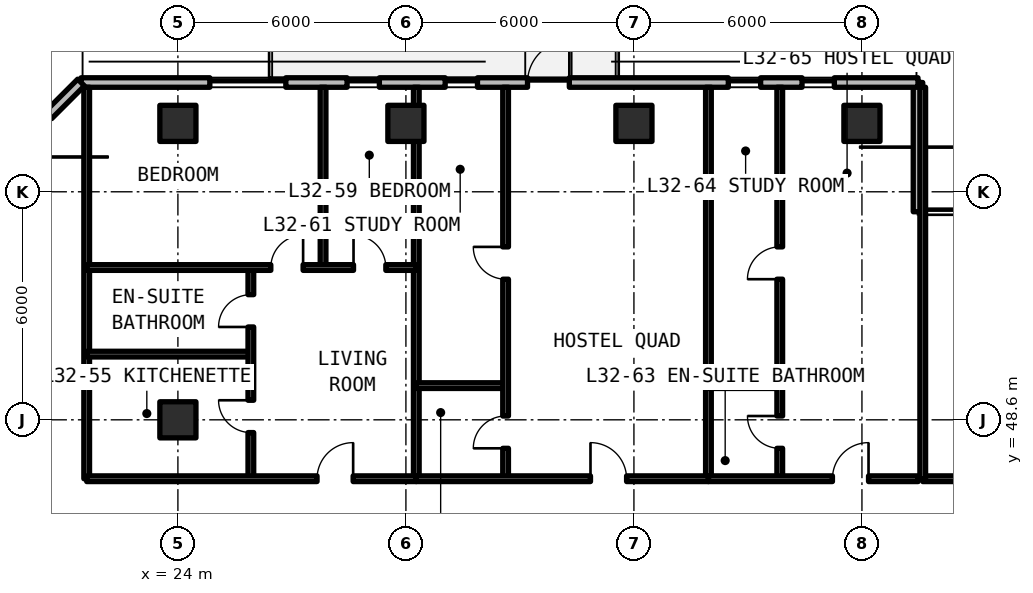
"""IFC4 building model, lengths in metres.
Left out: names, types, materials, properties, quantities, classifications, styles, units other than length and angle.
Written with IfcOpenShell. Run it as: python <this file> out.ifc"""

import sys

from ifc_helpers import new_model, si_unit, direction, frame, frame_2d, origin, origin_2d, place, context, subcontext, project, spatial, rectangle, extrude, element, fill, save


model = new_model("IFC4")
c1 = context("Model", 3, precision=1e-05, world=origin(), true_north=direction((0.0, 1.0)))
c2 = subcontext(c1, "Body", "Model", "MODEL_VIEW")
j1 = project(units=[si_unit("LENGTHUNIT", "METRE"), si_unit("PLANEANGLEUNIT", "RADIAN")], contexts=[c1])
p1 = place(None, origin())
s1 = spatial("IfcSite", under=j1, at=p1, CompositionType="ELEMENT")
p2 = place(p1, origin())
s2 = spatial("IfcBuilding", under=s1, at=p2, CompositionType="ELEMENT")
p3 = place(p2, frame((0.0, 0.0, 115.83)))
s3 = spatial("IfcBuildingStorey", under=s2, at=p3, CompositionType="ELEMENT", Elevation=115.83)
for number, where, z_axis, x_axis in (
    (1, (24.0, 48.6, 0.0), (0.0, 0.0, 1.0), (1.0, 0.0, 0.0)),
    (2, (24.0, 56.4, 0.0), (0.0, 0.0, 1.0), (1.0, 0.0, 0.0)),
    (3, (30.0, 56.4, 0.0), (0.0, 0.0, 1.0), (1.0, 0.0, 0.0)),
    (4, (36.0, 56.4, 0.0), (0.0, 0.0, 1.0), (1.0, 0.0, 0.0)),
    (5, (42.0, 56.4, 0.0), (0.0, 0.0, 1.0), (1.0, 0.0, 0.0)),
):
    element("IfcColumn", number, at=place(p3, frame(where, z_axis=z_axis, x_axis=x_axis)), inside=s3, PredefinedType="COLUMN", context=c2, shape_type="SweptSolid", body=[
        extrude(rectangle(XDim=0.95, YDim=0.95, at=origin_2d()), origin(), (0.0, 0.0, 1.0), 3.63),
    ])
p4 = place(p3, frame((43.475, 54.075, 0.0), z_axis=(0.0, 0.0, 1.0), x_axis=(0.0, 1.0, 0.0)))
e6 = element("IfcWall", 6, at=p4, inside=s3, PredefinedType="SOLIDWALL", context=c2, shape_type="SweptSolid", body=[
    extrude(rectangle(XDim=3.4, YDim=0.25, at=frame_2d((1.7, 0.0))), origin(), (0.0, 0.0, 1.0), 3.41),
])
p5 = place(p3, frame((43.475, 57.475, 0.0), z_axis=(0.0, 0.0, 1.0), x_axis=(-1.0, 0.0, 0.0)))
e7 = element("IfcWall", 7, at=p5, inside=s3, PredefinedType="SOLIDWALL", context=c2, shape_type="SweptSolid", body=[
    extrude(rectangle(XDim=22.023, YDim=0.25, at=frame_2d((11.012, 0.0))), origin(), (0.0, 0.0, 1.0), 3.41),
])
p6 = place(p5, frame((9.175, 0.0, 0.0)))
e8 = element("IfcOpeningElement", 8, at=p6, cuts=e7, PredefinedType="OPENING", context=c2, shape_type="SweptSolid", body=[
    extrude(rectangle(XDim=1.1, YDim=2.15, at=frame_2d((0.55, 1.075))), frame((0.0, 0.135, 0.0), z_axis=(0.0, -1.0, 0.0), x_axis=(1.0, 0.0, 0.0)), (0.0, 0.0, 1.0), 0.27),
])
p7 = place(p5, frame((16.635, 0.0, 0.78)))
e9 = element("IfcOpeningElement", 9, at=p7, cuts=e7, PredefinedType="OPENING", context=c2, shape_type="SweptSolid", body=[
    extrude(rectangle(XDim=2.0, YDim=1.66, at=frame_2d((1.0, 0.83))), frame((0.0, 0.135, 0.0), z_axis=(0.0, -1.0, 0.0), x_axis=(1.0, 0.0, 0.0)), (0.0, 0.0, 1.0), 0.27),
])
p8 = place(p5, frame((14.173, 0.0, 0.78)))
e10 = element("IfcOpeningElement", 10, at=p8, cuts=e7, PredefinedType="OPENING", context=c2, shape_type="SweptSolid", body=[
    extrude(rectangle(XDim=0.85, YDim=1.65, at=frame_2d((0.425, 0.825))), frame((0.0, 0.135, 0.0), z_axis=(0.0, -1.0, 0.0), x_axis=(1.0, 0.0, 0.0)), (0.0, 0.0, 1.0), 0.27),
])
p9 = place(p5, frame((11.592, 0.0, 0.78)))
e11 = element("IfcOpeningElement", 11, at=p9, cuts=e7, PredefinedType="OPENING", context=c2, shape_type="SweptSolid", body=[
    extrude(rectangle(XDim=0.85, YDim=1.65, at=frame_2d((0.425, 0.825))), frame((0.0, 0.135, 0.0), z_axis=(0.0, -1.0, 0.0), x_axis=(1.0, 0.0, 0.0)), (0.0, 0.0, 1.0), 0.27),
])
p10 = place(p5, frame((4.141, 0.0, 0.78)))
e12 = element("IfcOpeningElement", 12, at=p10, cuts=e7, PredefinedType="OPENING", context=c2, shape_type="SweptSolid", body=[
    extrude(rectangle(XDim=0.85, YDim=1.65, at=frame_2d((0.425, 0.825))), frame((0.0, 0.135, 0.0), z_axis=(0.0, -1.0, 0.0), x_axis=(1.0, 0.0, 0.0)), (0.0, 0.0, 1.0), 0.27),
])
p11 = place(p5, frame((2.201, 0.0, 0.78)))
e13 = element("IfcOpeningElement", 13, at=p11, cuts=e7, PredefinedType="OPENING", context=c2, shape_type="SweptSolid", body=[
    extrude(rectangle(XDim=0.85, YDim=1.65, at=frame_2d((0.425, 0.825))), frame((0.0, 0.135, 0.0), z_axis=(0.0, -1.0, 0.0), x_axis=(1.0, 0.0, 0.0)), (0.0, 0.0, 1.0), 0.27),
])
p12 = place(p3, frame((21.452, 57.475, 0.0), z_axis=(0.0, 0.0, 1.0), x_axis=(-0.707106781187, -0.707106781187, 0.0)))
e14 = element("IfcWall", 14, at=p12, inside=s3, PredefinedType="SOLIDWALL", context=c2, shape_type="SweptSolid", body=[
    extrude(rectangle(XDim=5.836, YDim=0.25, at=frame_2d((2.918, 0.0))), origin(), (0.0, 0.0, 1.0), 3.41),
])
p13 = place(p12, frame((1.218, 0.0, 0.78)))
e15 = element("IfcOpeningElement", 15, at=p13, cuts=e14, PredefinedType="OPENING", context=c2, shape_type="SweptSolid", body=[
    extrude(rectangle(XDim=3.4, YDim=1.66, at=frame_2d((1.7, 0.83))), frame((0.0, 0.135, 0.0), z_axis=(0.0, -1.0, 0.0), x_axis=(1.0, 0.0, 0.0)), (0.0, 0.0, 1.0), 0.27),
])
p14 = place(p3, frame((43.6, 47.05, 0.0), z_axis=(0.0, 0.0, 1.0), x_axis=(1.0, 0.0, 0.0)))
e16 = element("IfcWall", 16, at=p14, inside=s3, PredefinedType="SOLIDWALL", context=c2, shape_type="SweptSolid", body=[
    extrude(rectangle(XDim=8.4, YDim=0.15, at=frame_2d((4.2, 0.0))), origin(), (0.0, 0.0, 1.0), 2.63),
])
p15 = place(p14, frame((3.65, 0.0, 0.0)))
e17 = element("IfcOpeningElement", 17, at=p15, cuts=e16, PredefinedType="OPENING", context=c2, shape_type="SweptSolid", body=[
    extrude(rectangle(XDim=1.1, YDim=2.15, at=frame_2d((0.55, 1.075))), frame((0.0, 0.085, 0.0), z_axis=(0.0, -1.0, 0.0), x_axis=(1.0, 0.0, 0.0)), (0.0, 0.0, 1.0), 0.17),
])
for number, where, z_axis, x_axis in (
    (18, (43.6, 47.05, 0.0), (0.0, 0.0, 1.0), (0.0, 1.0, 0.0)),
    (19, (21.6, 47.05, 0.0), (0.0, 0.0, 1.0), (0.0, 1.0, 0.0)),
    (20, (30.273, 47.05, 0.0), (0.0, 0.0, 1.0), (0.0, 1.0, 0.0)),
):
    element("IfcWall", number, at=place(p3, frame(where, z_axis=z_axis, x_axis=x_axis)), inside=s3, PredefinedType="SOLIDWALL", context=c2, shape_type="SweptSolid", body=[
        extrude(rectangle(XDim=10.3, YDim=0.15, at=frame_2d((5.15, 0.0))), origin(), (0.0, 0.0, 1.0), 2.63),
    ])
p16 = place(p3, frame((21.6, 50.329, 0.0), z_axis=(0.0, 0.0, 1.0), x_axis=(1.0, 0.0, 0.0)))
e21 = element("IfcWall", 21, at=p16, inside=s3, PredefinedType="PARTITIONING", context=c2, shape_type="SweptSolid", body=[
    extrude(rectangle(XDim=4.32, YDim=0.15, at=frame_2d((2.16, 0.0))), origin(), (0.0, 0.0, 1.0), 2.63),
])
p17 = place(p3, frame((25.92, 47.05, 0.0), z_axis=(0.0, 0.0, 1.0), x_axis=(0.0, 1.0, 0.0)))
e22 = element("IfcWall", 22, at=p17, inside=s3, PredefinedType="PARTITIONING", context=c2, shape_type="SweptSolid", body=[
    extrude(rectangle(XDim=5.557, YDim=0.15, at=frame_2d((2.779, 0.0))), origin(), (0.0, 0.0, 1.0), 2.63),
])
p18 = place(p17, frame((1.214, 0.0, 0.0)))
e23 = element("IfcOpeningElement", 23, at=p18, cuts=e22, PredefinedType="OPENING", context=c2, shape_type="SweptSolid", body=[
    extrude(rectangle(XDim=0.85, YDim=2.1, at=frame_2d((0.425, 1.05))), frame((0.0, 0.085, 0.0), z_axis=(0.0, -1.0, 0.0), x_axis=(1.0, 0.0, 0.0)), (0.0, 0.0, 1.0), 0.17),
])
p19 = place(p17, frame((3.993, 0.0, 0.0)))
e24 = element("IfcOpeningElement", 24, at=p19, cuts=e22, PredefinedType="OPENING", context=c2, shape_type="SweptSolid", body=[
    extrude(rectangle(XDim=0.85, YDim=2.1, at=frame_2d((0.425, 1.05))), frame((0.0, 0.085, 0.0), z_axis=(0.0, -1.0, 0.0), x_axis=(1.0, 0.0, 0.0)), (0.0, 0.0, 1.0), 0.17),
])
p20 = place(p3, frame((27.82, 52.607, 0.0), z_axis=(0.0, 0.0, 1.0), x_axis=(0.0, 1.0, 0.0)))
e25 = element("IfcWall", 25, at=p20, inside=s3, PredefinedType="PARTITIONING", context=c2, shape_type="SweptSolid", body=[
    extrude(rectangle(XDim=4.743, YDim=0.15, at=frame_2d((2.372, 0.0))), origin(), (0.0, 0.0, 1.0), 2.63),
])
p21 = place(p3, frame((21.6, 52.607, 0.0), z_axis=(0.0, 0.0, 1.0), x_axis=(1.0, 0.0, 0.0)))
e26 = element("IfcWall", 26, at=p21, inside=s3, PredefinedType="PARTITIONING", context=c2, shape_type="SweptSolid", body=[
    extrude(rectangle(XDim=8.673, YDim=0.15, at=frame_2d((4.336, 0.0))), origin(), (0.0, 0.0, 1.0), 2.63),
])
p22 = place(p21, frame((4.845, 0.0, 0.0)))
e27 = element("IfcOpeningElement", 27, at=p22, cuts=e26, PredefinedType="OPENING", context=c2, shape_type="SweptSolid", body=[
    extrude(rectangle(XDim=0.85, YDim=2.1, at=frame_2d((0.425, 1.05))), frame((0.0, 0.085, 0.0), z_axis=(0.0, -1.0, 0.0), x_axis=(1.0, 0.0, 0.0)), (0.0, 0.0, 1.0), 0.17),
])
p23 = place(p21, frame((7.021, 0.0, 0.0)))
e28 = element("IfcOpeningElement", 28, at=p23, cuts=e26, PredefinedType="OPENING", context=c2, shape_type="SweptSolid", body=[
    extrude(rectangle(XDim=0.85, YDim=2.1, at=frame_2d((0.425, 1.05))), frame((0.0, 0.085, 0.0), z_axis=(0.0, -1.0, 0.0), x_axis=(1.0, 0.0, 0.0)), (0.0, 0.0, 1.0), 0.17),
])
p24 = place(p3, frame((21.6, 47.05, 0.0), z_axis=(0.0, 0.0, 1.0), x_axis=(1.0, 0.0, 0.0)))
e29 = element("IfcWall", 29, at=p24, inside=s3, PredefinedType="SOLIDWALL", context=c2, shape_type="SweptSolid", body=[
    extrude(rectangle(XDim=8.673, YDim=0.15, at=frame_2d((4.336, 0.0))), origin(), (0.0, 0.0, 1.0), 2.63),
])
p25 = place(p24, frame((6.062, 0.0, 0.0)))
e30 = element("IfcOpeningElement", 30, at=p25, cuts=e29, PredefinedType="OPENING", context=c2, shape_type="SweptSolid", body=[
    extrude(rectangle(XDim=0.95, YDim=2.15, at=frame_2d((0.475, 1.075))), frame((0.0, 0.085, 0.0), z_axis=(0.0, -1.0, 0.0), x_axis=(1.0, 0.0, 0.0)), (0.0, 0.0, 1.0), 0.17),
])
p26 = place(p3, frame((37.961, 47.05, 0.0), z_axis=(0.0, 0.0, 1.0), x_axis=(0.0, 1.0, 0.0)))
e31 = element("IfcWall", 31, at=p26, inside=s3, PredefinedType="SOLIDWALL", context=c2, shape_type="SweptSolid", body=[
    extrude(rectangle(XDim=10.3, YDim=0.15, at=frame_2d((5.15, 0.0))), origin(), (0.0, 0.0, 1.0), 2.63),
])
p27 = place(p3, frame((30.273, 49.5, 0.0), z_axis=(0.0, 0.0, 1.0), x_axis=(1.0, 0.0, 0.0)))
e32 = element("IfcWall", 32, at=p27, inside=s3, PredefinedType="PARTITIONING", context=c2, shape_type="SweptSolid", body=[
    extrude(rectangle(XDim=2.35, YDim=0.15, at=frame_2d((1.175, 0.0))), origin(), (0.0, 0.0, 1.0), 2.63),
])
p28 = place(p3, frame((32.623, 47.05, 0.0), z_axis=(0.0, 0.0, 1.0), x_axis=(0.0, 1.0, 0.0)))
e33 = element("IfcWall", 33, at=p28, inside=s3, PredefinedType="PARTITIONING", context=c2, shape_type="SweptSolid", body=[
    extrude(rectangle(XDim=10.3, YDim=0.15, at=frame_2d((5.15, 0.0))), origin(), (0.0, 0.0, 1.0), 2.63),
])
p29 = place(p28, frame((0.8, 0.0, 0.0)))
e34 = element("IfcOpeningElement", 34, at=p29, cuts=e33, PredefinedType="OPENING", context=c2, shape_type="SweptSolid", body=[
    extrude(rectangle(XDim=0.85, YDim=2.1, at=frame_2d((0.425, 1.05))), frame((0.0, 0.085, 0.0), z_axis=(0.0, -1.0, 0.0), x_axis=(1.0, 0.0, 0.0)), (0.0, 0.0, 1.0), 0.17),
])
p30 = place(p28, frame((5.25, 0.0, 0.0)))
e35 = element("IfcOpeningElement", 35, at=p30, cuts=e33, PredefinedType="OPENING", context=c2, shape_type="SweptSolid", body=[
    extrude(rectangle(XDim=0.85, YDim=2.1, at=frame_2d((0.425, 1.05))), frame((0.0, 0.085, 0.0), z_axis=(0.0, -1.0, 0.0), x_axis=(1.0, 0.0, 0.0)), (0.0, 0.0, 1.0), 0.17),
])
p31 = place(p3, frame((30.273, 47.05, 0.0), z_axis=(0.0, 0.0, 1.0), x_axis=(1.0, 0.0, 0.0)))
e36 = element("IfcWall", 36, at=p31, inside=s3, PredefinedType="SOLIDWALL", context=c2, shape_type="SweptSolid", body=[
    extrude(rectangle(XDim=7.688, YDim=0.15, at=frame_2d((3.844, 0.0))), origin(), (0.0, 0.0, 1.0), 2.63),
])
p32 = place(p31, frame((4.584, 0.0, 0.0)))
e37 = element("IfcOpeningElement", 37, at=p32, cuts=e36, PredefinedType="OPENING", context=c2, shape_type="SweptSolid", body=[
    extrude(rectangle(XDim=0.95, YDim=2.15, at=frame_2d((0.475, 1.075))), frame((0.0, 0.085, 0.0), z_axis=(0.0, -1.0, 0.0), x_axis=(1.0, 0.0, 0.0)), (0.0, 0.0, 1.0), 0.17),
])
p33 = place(p3, frame((37.961, 49.5, 0.0), z_axis=(0.0, 0.0, 1.0), x_axis=(1.0, 0.0, 0.0)))
e38 = element("IfcWall", 38, at=p33, inside=s3, PredefinedType="PARTITIONING", context=c2, shape_type="SweptSolid", body=[
    extrude(rectangle(XDim=1.877, YDim=0.15, at=frame_2d((0.938, 0.0))), origin(), (0.0, 0.0, 1.0), 2.63),
])
p34 = place(p3, frame((39.837, 47.05, 0.0), z_axis=(0.0, 0.0, 1.0), x_axis=(0.0, 1.0, 0.0)))
e39 = element("IfcWall", 39, at=p34, inside=s3, PredefinedType="PARTITIONING", context=c2, shape_type="SweptSolid", body=[
    extrude(rectangle(XDim=10.3, YDim=0.15, at=frame_2d((5.15, 0.0))), origin(), (0.0, 0.0, 1.0), 2.63),
])
p35 = place(p34, frame((0.8, 0.0, 0.0)))
e40 = element("IfcOpeningElement", 40, at=p35, cuts=e39, PredefinedType="OPENING", context=c2, shape_type="SweptSolid", body=[
    extrude(rectangle(XDim=0.85, YDim=2.1, at=frame_2d((0.425, 1.05))), frame((0.0, 0.085, 0.0), z_axis=(0.0, -1.0, 0.0), x_axis=(1.0, 0.0, 0.0)), (0.0, 0.0, 1.0), 0.17),
])
p36 = place(p34, frame((5.25, 0.0, 0.0)))
e41 = element("IfcOpeningElement", 41, at=p36, cuts=e39, PredefinedType="OPENING", context=c2, shape_type="SweptSolid", body=[
    extrude(rectangle(XDim=0.85, YDim=2.1, at=frame_2d((0.425, 1.05))), frame((0.0, 0.085, 0.0), z_axis=(0.0, -1.0, 0.0), x_axis=(1.0, 0.0, 0.0)), (0.0, 0.0, 1.0), 0.17),
])
p37 = place(p3, frame((37.961, 47.05, 0.0), z_axis=(0.0, 0.0, 1.0), x_axis=(1.0, 0.0, 0.0)))
e42 = element("IfcWall", 42, at=p37, inside=s3, PredefinedType="SOLIDWALL", context=c2, shape_type="SweptSolid", body=[
    extrude(rectangle(XDim=5.519, YDim=0.15, at=frame_2d((2.76, 0.0))), origin(), (0.0, 0.0, 1.0), 2.63),
])
p38 = place(p37, frame((3.263, 0.0, 0.0)))
e43 = element("IfcOpeningElement", 43, at=p38, cuts=e42, PredefinedType="OPENING", context=c2, shape_type="SweptSolid", body=[
    extrude(rectangle(XDim=0.95, YDim=2.15, at=frame_2d((0.475, 1.075))), frame((0.0, 0.085, 0.0), z_axis=(0.0, -1.0, 0.0), x_axis=(1.0, 0.0, 0.0)), (0.0, 0.0, 1.0), 0.17),
])
p39 = place(p6, frame((1.1, 0.0, 0.0), z_axis=(0.0, 0.0, 1.0), x_axis=(-1.0, 0.0, 0.0)))
e44 = element("IfcDoor", 44, at=p39, inside=s3, OperationType="SINGLE_SWING_RIGHT", PredefinedType="DOOR", context=c2, shape_type="SweptSolid", body=[
    extrude(rectangle(XDim=1.1, YDim=2.15, at=frame_2d((0.55, 1.075))), frame((0.0, 0.025, 0.0), z_axis=(0.0, -1.0, 0.0), x_axis=(1.0, 0.0, 0.0)), (0.0, 0.0, 1.0), 0.05),
])
fill(e8, e44)
p40 = place(p7, origin())
e45 = element("IfcWindow", 45, at=p40, inside=s3, PartitioningType="SINGLE_PANEL", PredefinedType="WINDOW", context=c2, shape_type="SweptSolid", body=[
    extrude(rectangle(XDim=2.0, YDim=1.66, at=frame_2d((1.0, 0.83))), frame((0.0, 0.03, 0.0), z_axis=(0.0, -1.0, 0.0), x_axis=(1.0, 0.0, 0.0)), (0.0, 0.0, 1.0), 0.06),
])
fill(e9, e45)
p41 = place(p8, origin())
e46 = element("IfcWindow", 46, at=p41, inside=s3, PartitioningType="SINGLE_PANEL", PredefinedType="WINDOW", context=c2, shape_type="SweptSolid", body=[
    extrude(rectangle(XDim=0.85, YDim=1.65, at=frame_2d((0.425, 0.825))), frame((0.0, 0.03, 0.0), z_axis=(0.0, -1.0, 0.0), x_axis=(1.0, 0.0, 0.0)), (0.0, 0.0, 1.0), 0.06),
])
fill(e10, e46)
p42 = place(p9, origin())
e47 = element("IfcWindow", 47, at=p42, inside=s3, PartitioningType="SINGLE_PANEL", PredefinedType="WINDOW", context=c2, shape_type="SweptSolid", body=[
    extrude(rectangle(XDim=0.85, YDim=1.65, at=frame_2d((0.425, 0.825))), frame((0.0, 0.03, 0.0), z_axis=(0.0, -1.0, 0.0), x_axis=(1.0, 0.0, 0.0)), (0.0, 0.0, 1.0), 0.06),
])
fill(e11, e47)
p43 = place(p10, origin())
e48 = element("IfcWindow", 48, at=p43, inside=s3, PartitioningType="SINGLE_PANEL", PredefinedType="WINDOW", context=c2, shape_type="SweptSolid", body=[
    extrude(rectangle(XDim=0.85, YDim=1.65, at=frame_2d((0.425, 0.825))), frame((0.0, 0.03, 0.0), z_axis=(0.0, -1.0, 0.0), x_axis=(1.0, 0.0, 0.0)), (0.0, 0.0, 1.0), 0.06),
])
fill(e12, e48)
p44 = place(p11, origin())
e49 = element("IfcWindow", 49, at=p44, inside=s3, PartitioningType="SINGLE_PANEL", PredefinedType="WINDOW", context=c2, shape_type="SweptSolid", body=[
    extrude(rectangle(XDim=0.85, YDim=1.65, at=frame_2d((0.425, 0.825))), frame((0.0, 0.03, 0.0), z_axis=(0.0, -1.0, 0.0), x_axis=(1.0, 0.0, 0.0)), (0.0, 0.0, 1.0), 0.06),
])
fill(e13, e49)
p45 = place(p18, origin())
e50 = element("IfcDoor", 50, at=p45, inside=s3, OperationType="SINGLE_SWING_RIGHT", PredefinedType="DOOR", context=c2, shape_type="SweptSolid", body=[
    extrude(rectangle(XDim=0.85, YDim=2.1, at=frame_2d((0.425, 1.05))), frame((0.0, 0.025, 0.0), z_axis=(0.0, -1.0, 0.0), x_axis=(1.0, 0.0, 0.0)), (0.0, 0.0, 1.0), 0.05),
])
fill(e23, e50)
p46 = place(p19, origin())
e51 = element("IfcDoor", 51, at=p46, inside=s3, OperationType="SINGLE_SWING_LEFT", PredefinedType="DOOR", context=c2, shape_type="SweptSolid", body=[
    extrude(rectangle(XDim=0.85, YDim=2.1, at=frame_2d((0.425, 1.05))), frame((0.0, 0.025, 0.0), z_axis=(0.0, -1.0, 0.0), x_axis=(1.0, 0.0, 0.0)), (0.0, 0.0, 1.0), 0.05),
])
fill(e24, e51)
p47 = place(p22, origin())
e52 = element("IfcDoor", 52, at=p47, inside=s3, OperationType="SINGLE_SWING_RIGHT", PredefinedType="DOOR", context=c2, shape_type="SweptSolid", body=[
    extrude(rectangle(XDim=0.85, YDim=2.1, at=frame_2d((0.425, 1.05))), frame((0.0, 0.025, 0.0), z_axis=(0.0, -1.0, 0.0), x_axis=(1.0, 0.0, 0.0)), (0.0, 0.0, 1.0), 0.05),
])
fill(e27, e52)
p48 = place(p23, origin())
e53 = element("IfcDoor", 53, at=p48, inside=s3, OperationType="SINGLE_SWING_LEFT", PredefinedType="DOOR", context=c2, shape_type="SweptSolid", body=[
    extrude(rectangle(XDim=0.85, YDim=2.1, at=frame_2d((0.425, 1.05))), frame((0.0, 0.025, 0.0), z_axis=(0.0, -1.0, 0.0), x_axis=(1.0, 0.0, 0.0)), (0.0, 0.0, 1.0), 0.05),
])
fill(e28, e53)
p49 = place(p25, origin())
e54 = element("IfcDoor", 54, at=p49, inside=s3, OperationType="SINGLE_SWING_RIGHT", PredefinedType="DOOR", context=c2, shape_type="SweptSolid", body=[
    extrude(rectangle(XDim=0.95, YDim=2.15, at=frame_2d((0.475, 1.075))), frame((0.0, 0.025, 0.0), z_axis=(0.0, -1.0, 0.0), x_axis=(1.0, 0.0, 0.0)), (0.0, 0.0, 1.0), 0.05),
])
fill(e30, e54)
p50 = place(p29, origin())
e55 = element("IfcDoor", 55, at=p50, inside=s3, OperationType="SINGLE_SWING_LEFT", PredefinedType="DOOR", context=c2, shape_type="SweptSolid", body=[
    extrude(rectangle(XDim=0.85, YDim=2.1, at=frame_2d((0.425, 1.05))), frame((0.0, 0.025, 0.0), z_axis=(0.0, -1.0, 0.0), x_axis=(1.0, 0.0, 0.0)), (0.0, 0.0, 1.0), 0.05),
])
fill(e34, e55)
p51 = place(p30, origin())
e56 = element("IfcDoor", 56, at=p51, inside=s3, OperationType="SINGLE_SWING_RIGHT", PredefinedType="DOOR", context=c2, shape_type="SweptSolid", body=[
    extrude(rectangle(XDim=0.85, YDim=2.1, at=frame_2d((0.425, 1.05))), frame((0.0, 0.025, 0.0), z_axis=(0.0, -1.0, 0.0), x_axis=(1.0, 0.0, 0.0)), (0.0, 0.0, 1.0), 0.05),
])
fill(e35, e56)
p52 = place(p32, origin())
e57 = element("IfcDoor", 57, at=p52, inside=s3, OperationType="SINGLE_SWING_LEFT", PredefinedType="DOOR", context=c2, shape_type="SweptSolid", body=[
    extrude(rectangle(XDim=0.95, YDim=2.15, at=frame_2d((0.475, 1.075))), frame((0.0, 0.025, 0.0), z_axis=(0.0, -1.0, 0.0), x_axis=(1.0, 0.0, 0.0)), (0.0, 0.0, 1.0), 0.05),
])
fill(e37, e57)
p53 = place(p35, origin())
e58 = element("IfcDoor", 58, at=p53, inside=s3, OperationType="SINGLE_SWING_RIGHT", PredefinedType="DOOR", context=c2, shape_type="SweptSolid", body=[
    extrude(rectangle(XDim=0.85, YDim=2.1, at=frame_2d((0.425, 1.05))), frame((0.0, 0.025, 0.0), z_axis=(0.0, -1.0, 0.0), x_axis=(1.0, 0.0, 0.0)), (0.0, 0.0, 1.0), 0.05),
])
fill(e40, e58)
p54 = place(p36, origin())
e59 = element("IfcDoor", 59, at=p54, inside=s3, OperationType="SINGLE_SWING_LEFT", PredefinedType="DOOR", context=c2, shape_type="SweptSolid", body=[
    extrude(rectangle(XDim=0.85, YDim=2.1, at=frame_2d((0.425, 1.05))), frame((0.0, 0.025, 0.0), z_axis=(0.0, -1.0, 0.0), x_axis=(1.0, 0.0, 0.0)), (0.0, 0.0, 1.0), 0.05),
])
fill(e41, e59)
p55 = place(p38, origin())
e60 = element("IfcDoor", 60, at=p55, inside=s3, OperationType="SINGLE_SWING_RIGHT", PredefinedType="DOOR", context=c2, shape_type="SweptSolid", body=[
    extrude(rectangle(XDim=0.95, YDim=2.15, at=frame_2d((0.475, 1.075))), frame((0.0, 0.025, 0.0), z_axis=(0.0, -1.0, 0.0), x_axis=(1.0, 0.0, 0.0)), (0.0, 0.0, 1.0), 0.05),
])
fill(e43, e60)
save(model, sys.argv[1])
